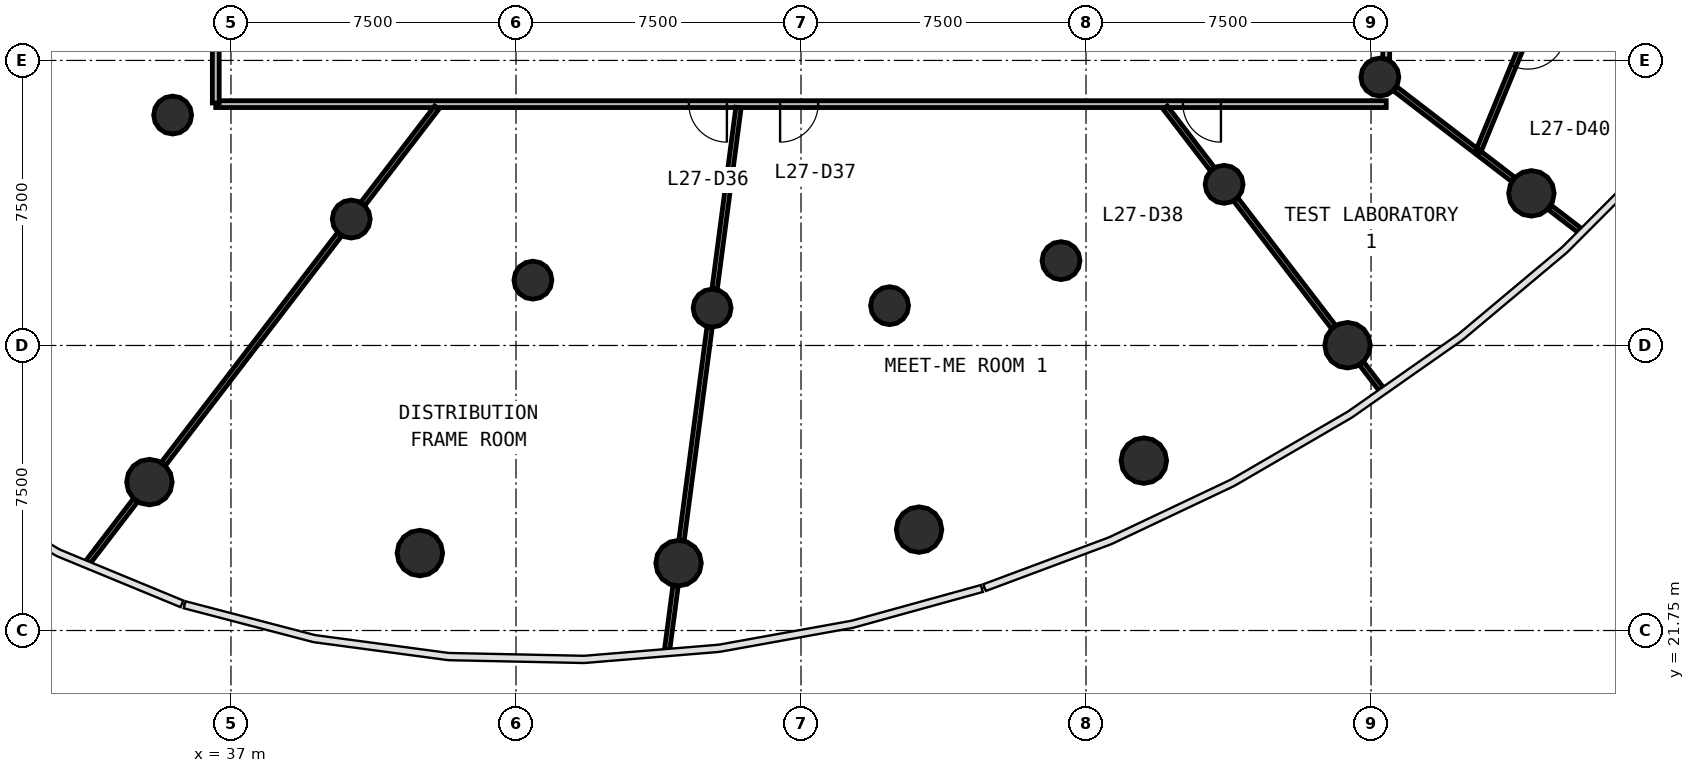
"""IFC4 building model, lengths in metres.
Left out: names, types, materials, properties, quantities, classifications, styles, units other than length and angle.
Written with IfcOpenShell. Run it as: python <this file> out.ifc"""

import sys

from ifc_helpers import new_model, si_unit, direction, frame, frame_2d, origin, origin_2d, place, context, subcontext, project, spatial, rectangle, circle, extrude, source, transform, mapped, element, fill, save


model = new_model("IFC4")
c1 = context("Model", 3, precision=1e-05, world=origin(), true_north=direction((0.0, 1.0)))
c2 = subcontext(c1, "Body", "Model", "MODEL_VIEW")
j1 = project(units=[si_unit("LENGTHUNIT", "METRE"), si_unit("PLANEANGLEUNIT", "RADIAN")], contexts=[c1])
p1 = place(None, origin())
s1 = spatial("IfcSite", under=j1, at=p1, CompositionType="ELEMENT")
p2 = place(p1, origin())
s2 = spatial("IfcBuilding", under=s1, at=p2, CompositionType="ELEMENT")
p3 = place(p2, frame((0.0, 0.0, 116.7)))
s3 = spatial("IfcBuildingStorey", under=s2, at=p3, CompositionType="ELEMENT", Elevation=116.7)
m1 = source(origin(), c2, "Body", "SweptSolid", [
    extrude(circle(Radius=0.6, at=origin_2d()), origin(), (0.0, 0.0, 1.0), 4.1),
])
for number, where, z_axis, x_axis in (
    (1, (34.854, 25.655, 0.0), (0.0, 0.0, 1.0), (1.0, 0.0, 0.0)),
    (2, (41.971, 23.788, 0.0), (0.0, 0.0, 1.0), (1.0, 0.0, 0.0)),
    (3, (48.778, 23.523, 0.0), (0.0, 0.0, 1.0), (1.0, 0.0, 0.0)),
    (4, (55.106, 24.405, 0.0), (0.0, 0.0, 1.0), (1.0, 0.0, 0.0)),
    (5, (61.022, 26.219, 0.0), (0.0, 0.0, 1.0), (1.0, 0.0, 0.0)),
    (6, (66.382, 29.257, 0.0), (0.0, 0.0, 1.0), (1.0, 0.0, 0.0)),
    (7, (71.22, 33.252, 0.0), (0.0, 0.0, 1.0), (1.0, 0.0, 0.0)),
):
    element("IfcColumn", number, at=place(p3, frame(where, z_axis=z_axis, x_axis=x_axis)), inside=s3, PredefinedType="COLUMN", context=c2, shape_type="MappedRepresentation", body=[
        mapped(m1, transform((0.0, 0.0, 0.0), scale=1.0)),
    ])
m2 = source(origin(), c2, "Body", "SweptSolid", [
    extrude(circle(Radius=0.5, at=origin_2d()), origin(), (0.0, 0.0, 1.0), 4.1),
])
for number, where, z_axis, x_axis in (
    (8, (35.465, 35.312, 0.0), (0.0, 0.0, 1.0), (1.0, 0.0, 0.0)),
    (9, (40.165, 32.576, 0.0), (0.0, 0.0, 1.0), (1.0, 0.0, 0.0)),
    (10, (44.945, 30.969, 0.0), (0.0, 0.0, 1.0), (1.0, 0.0, 0.0)),
    (11, (49.661, 30.233, 0.0), (0.0, 0.0, 1.0), (1.0, 0.0, 0.0)),
    (12, (54.331, 30.297, 0.0), (0.0, 0.0, 1.0), (1.0, 0.0, 0.0)),
    (13, (58.842, 31.482, 0.0), (0.0, 0.0, 1.0), (1.0, 0.0, 0.0)),
    (14, (63.134, 33.49, 0.0), (0.0, 0.0, 1.0), (1.0, 0.0, 0.0)),
    (15, (67.232, 36.312, 0.0), (0.0, 0.0, 1.0), (1.0, 0.0, 0.0)),
):
    element("IfcColumn", number, at=place(p3, frame(where, z_axis=z_axis, x_axis=x_axis)), inside=s3, PredefinedType="COLUMN", context=c2, shape_type="MappedRepresentation", body=[
        mapped(m2, transform((0.0, 0.0, 0.0), scale=1.0)),
    ])
p4 = place(p3, frame((67.4, 35.6, 0.0), z_axis=(0.0, 0.0, 1.0), x_axis=(-1.0, 0.0, 0.0)))
e16 = element("IfcWall", 16, at=p4, inside=s3, PredefinedType="PARTITIONING", context=c2, shape_type="SweptSolid", body=[
    extrude(rectangle(XDim=30.8, YDim=0.18, at=frame_2d((15.4, 0.0))), origin(), (0.0, 0.0, 1.0), 2.9),
])
p5 = place(p4, frame((17.35, 0.0, 0.0)))
e17 = element("IfcOpeningElement", 17, at=p5, cuts=e16, PredefinedType="OPENING", context=c2, shape_type="SweptSolid", body=[
    extrude(rectangle(XDim=1.0, YDim=2.1, at=frame_2d((0.5, 1.05))), frame((0.0, 0.1, 0.0), z_axis=(0.0, -1.0, 0.0), x_axis=(1.0, 0.0, 0.0)), (0.0, 0.0, 1.0), 0.2),
])
p6 = place(p4, frame((14.95, 0.0, 0.0)))
e18 = element("IfcOpeningElement", 18, at=p6, cuts=e16, PredefinedType="OPENING", context=c2, shape_type="SweptSolid", body=[
    extrude(rectangle(XDim=1.0, YDim=2.1, at=frame_2d((0.5, 1.05))), frame((0.0, 0.1, 0.0), z_axis=(0.0, -1.0, 0.0), x_axis=(1.0, 0.0, 0.0)), (0.0, 0.0, 1.0), 0.2),
])
p7 = place(p4, frame((4.35, 0.0, 0.0)))
e19 = element("IfcOpeningElement", 19, at=p7, cuts=e16, PredefinedType="OPENING", context=c2, shape_type="SweptSolid", body=[
    extrude(rectangle(XDim=1.0, YDim=2.1, at=frame_2d((0.5, 1.05))), frame((0.0, 0.1, 0.0), z_axis=(0.0, -1.0, 0.0), x_axis=(1.0, 0.0, 0.0)), (0.0, 0.0, 1.0), 0.2),
])
p8 = place(p3, frame((67.4, 60.37, 0.0), z_axis=(0.0, 0.0, 1.0), x_axis=(0.0, -1.0, 0.0)))
e20 = element("IfcWall", 20, at=p8, inside=s3, PredefinedType="PARTITIONING", context=c2, shape_type="SweptSolid", body=[
    extrude(rectangle(XDim=23.583, YDim=0.18, at=frame_2d((11.791, 0.0))), origin(), (0.0, 0.0, 1.0), 2.9),
])
p9 = place(p8, frame((9.232, 0.0, 0.0)))
e21 = element("IfcOpeningElement", 21, at=p9, cuts=e20, PredefinedType="OPENING", context=c2, shape_type="SweptSolid", body=[
    extrude(rectangle(XDim=0.9, YDim=2.1, at=frame_2d((0.45, 1.05))), frame((0.0, 0.1, 0.0), z_axis=(0.0, -1.0, 0.0), x_axis=(1.0, 0.0, 0.0)), (0.0, 0.0, 1.0), 0.2),
])
p10 = place(p8, frame((6.232, 0.0, 0.0)))
e22 = element("IfcOpeningElement", 22, at=p10, cuts=e20, PredefinedType="OPENING", context=c2, shape_type="SweptSolid", body=[
    extrude(rectangle(XDim=0.9, YDim=2.1, at=frame_2d((0.45, 1.05))), frame((0.0, 0.1, 0.0), z_axis=(0.0, -1.0, 0.0), x_axis=(1.0, 0.0, 0.0)), (0.0, 0.0, 1.0), 0.2),
])
p11 = place(p8, frame((3.032, 0.0, 0.0)))
e23 = element("IfcOpeningElement", 23, at=p11, cuts=e20, PredefinedType="OPENING", context=c2, shape_type="SweptSolid", body=[
    extrude(rectangle(XDim=0.9, YDim=2.1, at=frame_2d((0.45, 1.05))), frame((0.0, 0.1, 0.0), z_axis=(0.0, -1.0, 0.0), x_axis=(1.0, 0.0, 0.0)), (0.0, 0.0, 1.0), 0.2),
])
p12 = place(p8, frame((14.732, 0.0, 0.0)))
e24 = element("IfcOpeningElement", 24, at=p12, cuts=e20, PredefinedType="OPENING", context=c2, shape_type="SweptSolid", body=[
    extrude(rectangle(XDim=1.0, YDim=2.1, at=frame_2d((0.5, 1.05))), frame((0.0, 0.1, 0.0), z_axis=(0.0, -1.0, 0.0), x_axis=(1.0, 0.0, 0.0)), (0.0, 0.0, 1.0), 0.2),
])
p13 = place(p8, frame((11.333, 0.0, 0.0)))
e25 = element("IfcOpeningElement", 25, at=p13, cuts=e20, PredefinedType="OPENING", context=c2, shape_type="SweptSolid", body=[
    extrude(rectangle(XDim=1.0, YDim=2.1, at=frame_2d((0.5, 1.05))), frame((0.0, 0.1, 0.0), z_axis=(0.0, -1.0, 0.0), x_axis=(1.0, 0.0, 0.0)), (0.0, 0.0, 1.0), 0.2),
])
p14 = place(p3, frame((36.6, 35.63, 0.0), z_axis=(0.0, 0.0, 1.0), x_axis=(0.0, 1.0, 0.0)))
e26 = element("IfcWall", 26, at=p14, inside=s3, PredefinedType="PARTITIONING", context=c2, shape_type="SweptSolid", body=[
    extrude(rectangle(XDim=23.583, YDim=0.18, at=frame_2d((11.791, 0.0))), origin(), (0.0, 0.0, 1.0), 2.9),
])
p15 = place(p14, frame((14.732, 0.0, 0.0)))
e27 = element("IfcOpeningElement", 27, at=p15, cuts=e26, PredefinedType="OPENING", context=c2, shape_type="SweptSolid", body=[
    extrude(rectangle(XDim=1.0, YDim=2.1, at=frame_2d((0.5, 1.05))), frame((0.0, 0.1, 0.0), z_axis=(0.0, -1.0, 0.0), x_axis=(1.0, 0.0, 0.0)), (0.0, 0.0, 1.0), 0.2),
])
p16 = place(p14, frame((11.333, 0.0, 0.0)))
e28 = element("IfcOpeningElement", 28, at=p16, cuts=e26, PredefinedType="OPENING", context=c2, shape_type="SweptSolid", body=[
    extrude(rectangle(XDim=1.0, YDim=2.1, at=frame_2d((0.5, 1.05))), frame((0.0, 0.1, 0.0), z_axis=(0.0, -1.0, 0.0), x_axis=(1.0, 0.0, 0.0)), (0.0, 0.0, 1.0), 0.2),
])
p17 = place(p3, frame((39.858, 32.176, 0.0), z_axis=(0.0, 0.0, 1.0), x_axis=(-0.608755907151, -0.793357577331, 0.0)))
e29 = element("IfcWall", 29, at=p17, inside=s3, PredefinedType="PARTITIONING", context=c2, shape_type="SweptSolid", body=[
    extrude(rectangle(XDim=7.615, YDim=0.14, at=frame_2d((3.808, 0.0))), origin(), (0.0, 0.0, 1.0), 2.9),
])
p18 = place(p3, frame((72.025, 39.705, 0.0), z_axis=(0.0, 0.0, 1.0), x_axis=(-0.380730787006, -0.924685929289, 0.0)))
e30 = element("IfcWall", 30, at=p18, inside=s3, PredefinedType="PARTITIONING", context=c2, shape_type="SweptSolid", body=[
    extrude(rectangle(XDim=5.811, YDim=0.14, at=frame_2d((2.906, 0.0))), origin(), (0.0, 0.0, 1.0), 2.9),
])
p19 = place(p18, frame((2.361, 0.0, 0.0)))
e31 = element("IfcOpeningElement", 31, at=p19, cuts=e30, PredefinedType="OPENING", context=c2, shape_type="SweptSolid", body=[
    extrude(rectangle(XDim=1.0, YDim=2.1, at=frame_2d((0.5, 1.05))), frame((0.0, 0.08, 0.0), z_axis=(0.0, -1.0, 0.0), x_axis=(1.0, 0.0, 0.0)), (0.0, 0.0, 1.0), 0.16),
])
p20 = place(p3, frame((49.595, 29.733, 0.0), z_axis=(0.0, 0.0, 1.0), x_axis=(-0.130510314557, -0.991446951578, 0.0)))
e32 = element("IfcWall", 32, at=p20, inside=s3, PredefinedType="PARTITIONING", context=c2, shape_type="SweptSolid", body=[
    extrude(rectangle(XDim=5.659, YDim=0.14, at=frame_2d((2.829, 0.0))), origin(), (0.0, 0.0, 1.0), 2.9),
])
p21 = place(p3, frame((50.356, 35.51, 0.0), z_axis=(0.0, 0.0, 1.0), x_axis=(-0.130523979823, -0.991445152639, 0.0)))
e33 = element("IfcWall", 33, at=p21, inside=s3, PredefinedType="PARTITIONING", context=c2, shape_type="SweptSolid", body=[
    extrude(rectangle(XDim=4.818, YDim=0.14, at=frame_2d((2.409, 0.0))), origin(), (0.0, 0.0, 1.0), 2.9),
])
p22 = place(p3, frame((63.441, 33.09, 0.0), z_axis=(0.0, 0.0, 1.0), x_axis=(0.608789197027, -0.793332032369, 0.0)))
e34 = element("IfcWall", 34, at=p22, inside=s3, PredefinedType="PARTITIONING", context=c2, shape_type="SweptSolid", body=[
    extrude(rectangle(XDim=4.227, YDim=0.14, at=frame_2d((2.113, 0.0))), origin(), (0.0, 0.0, 1.0), 2.9),
])
p23 = place(p3, frame((42.416, 35.51, 0.0), z_axis=(0.0, 0.0, 1.0), x_axis=(-0.60874605662, -0.793365135703, 0.0)))
e35 = element("IfcWall", 35, at=p23, inside=s3, PredefinedType="PARTITIONING", context=c2, shape_type="SweptSolid", body=[
    extrude(rectangle(XDim=3.194, YDim=0.14, at=frame_2d((1.597, 0.0))), origin(), (0.0, 0.0, 1.0), 2.9),
])
p24 = place(p3, frame((67.633, 36.005, 0.0), z_axis=(0.0, 0.0, 1.0), x_axis=(0.793349293227, -0.60876670321, 0.0)))
e36 = element("IfcWall", 36, at=p24, inside=s3, PredefinedType="PARTITIONING", context=c2, shape_type="SweptSolid", body=[
    extrude(rectangle(XDim=2.676, YDim=0.14, at=frame_2d((1.338, 0.0))), origin(), (0.0, 0.0, 1.0), 2.9),
])
p25 = place(p3, frame((61.584, 35.51, 0.0), z_axis=(0.0, 0.0, 1.0), x_axis=(0.608727763541, -0.793379171578, 0.0)))
e37 = element("IfcWall", 37, at=p25, inside=s3, PredefinedType="PARTITIONING", context=c2, shape_type="SweptSolid", body=[
    extrude(rectangle(XDim=2.042, YDim=0.14, at=frame_2d((1.021, 0.0))), origin(), (0.0, 0.0, 1.0), 2.9),
])
p26 = place(p3, frame((34.486, 25.176, 0.0), z_axis=(0.0, 0.0, 1.0), x_axis=(-0.608718034157, -0.793386636447, 0.0)))
e38 = element("IfcWall", 38, at=p26, inside=s3, PredefinedType="PARTITIONING", context=c2, shape_type="SweptSolid", body=[
    extrude(rectangle(XDim=2.057, YDim=0.14, at=frame_2d((1.029, 0.0))), origin(), (0.0, 0.0, 1.0), 2.9),
])
p27 = place(p3, frame((48.699, 22.924, 0.0), z_axis=(0.0, 0.0, 1.0), x_axis=(-0.130536236518, -0.991443538965, 0.0)))
e39 = element("IfcWall", 39, at=p27, inside=s3, PredefinedType="PARTITIONING", context=c2, shape_type="SweptSolid", body=[
    extrude(rectangle(XDim=1.7, YDim=0.14, at=frame_2d((0.85, 0.0))), origin(), (0.0, 0.0, 1.0), 2.9),
])
p28 = place(p3, frame((69.837, 34.313, 0.0), z_axis=(0.0, 0.0, 1.0), x_axis=(0.79334062517, -0.60877799932, 0.0)))
e40 = element("IfcWall", 40, at=p28, inside=s3, PredefinedType="PARTITIONING", context=c2, shape_type="SweptSolid", body=[
    extrude(rectangle(XDim=1.139, YDim=0.14, at=frame_2d((0.569, 0.0))), origin(), (0.0, 0.0, 1.0), 2.9),
])
p29 = place(p3, frame((71.699, 32.884, 0.0), z_axis=(0.0, 0.0, 1.0), x_axis=(0.793356384424, -0.608757461798, 0.0)))
e41 = element("IfcWall", 41, at=p29, inside=s3, PredefinedType="PARTITIONING", context=c2, shape_type="SweptSolid", body=[
    extrude(rectangle(XDim=0.99, YDim=0.14, at=frame_2d((0.495, 0.0))), origin(), (0.0, 0.0, 1.0), 2.9),
])
p30 = place(p3, frame((66.75, 28.778, 0.0), z_axis=(0.0, 0.0, 1.0), x_axis=(0.608624937743, -0.793458055071, 0.0)))
e42 = element("IfcWall", 42, at=p30, inside=s3, PredefinedType="PARTITIONING", context=c2, shape_type="SweptSolid", body=[
    extrude(rectangle(XDim=0.848, YDim=0.14, at=frame_2d((0.424, 0.0))), origin(), (0.0, 0.0, 1.0), 2.9),
])
m3 = source(origin(), c2, "Body", "SweptSolid", [
    extrude(rectangle(XDim=1.0, YDim=2.1, at=frame_2d((0.5, 1.05))), frame((0.0, 0.025, 0.0), z_axis=(0.0, -1.0, 0.0), x_axis=(1.0, 0.0, 0.0)), (0.0, 0.0, 1.0), 0.05),
])
p31 = place(p5, origin())
e43 = element("IfcDoor", 43, at=p31, inside=s3, OperationType="SINGLE_SWING_LEFT", PredefinedType="DOOR", context=c2, shape_type="MappedRepresentation", body=[
    mapped(m3, transform((0.0, 0.0, 0.0), scale=1.0)),
])
fill(e17, e43)
p32 = place(p6, origin())
e44 = element("IfcDoor", 44, at=p32, inside=s3, OperationType="SINGLE_SWING_RIGHT", PredefinedType="DOOR", context=c2, shape_type="MappedRepresentation", body=[
    mapped(m3, transform((0.0, 0.0, 0.0), scale=1.0)),
])
fill(e18, e44)
p33 = place(p7, origin())
e45 = element("IfcDoor", 45, at=p33, inside=s3, OperationType="SINGLE_SWING_LEFT", PredefinedType="DOOR", context=c2, shape_type="MappedRepresentation", body=[
    mapped(m3, transform((0.0, 0.0, 0.0), scale=1.0)),
])
fill(e19, e45)
p34 = place(p19, origin())
e46 = element("IfcDoor", 46, at=p34, inside=s3, OperationType="SINGLE_SWING_LEFT", PredefinedType="DOOR", context=c2, shape_type="MappedRepresentation", body=[
    mapped(m3, transform((0.0, 0.0, 0.0), scale=1.0)),
])
fill(e31, e46)
save(model, sys.argv[1])
